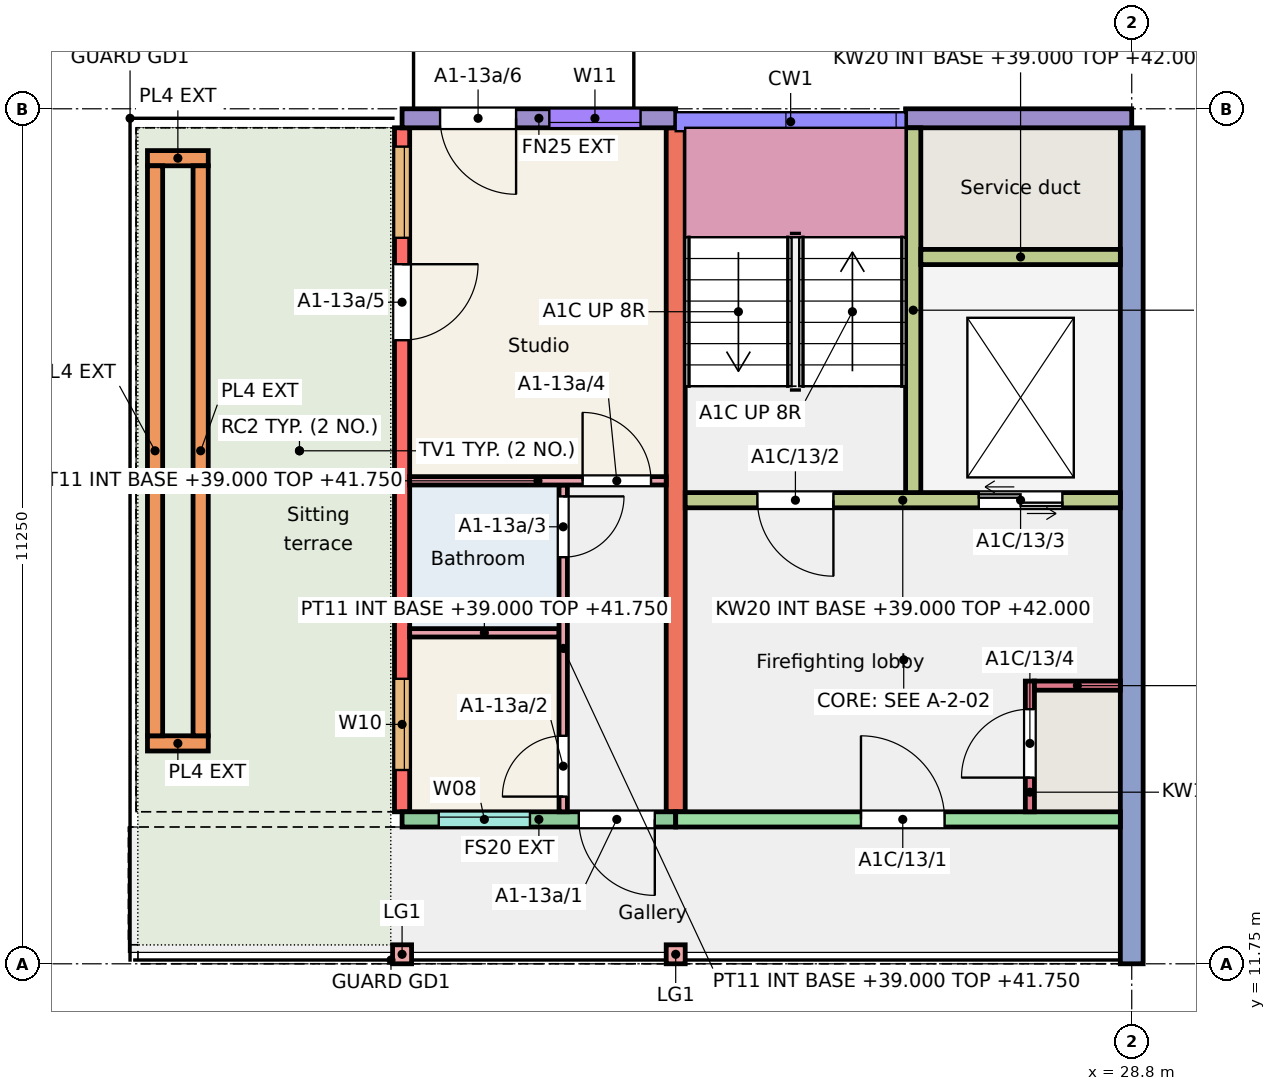
"""IFC4 building model, lengths in metres.
Left out: names, types, materials, properties, quantities, classifications, styles, units other than length and angle.
Written with IfcOpenShell. Run it as: python <this file> out.ifc"""

import sys

from ifc_helpers import new_model, si_unit, direction, frame, frame_2d, origin, origin_2d, place, context, subcontext, project, spatial, rectangle, extrude, element, fill, save


model = new_model("IFC4")
c1 = context("Model", 3, precision=1e-05, world=origin(), true_north=direction((0.0, 1.0)))
c2 = subcontext(c1, "Body", "Model", "MODEL_VIEW")
j1 = project(units=[si_unit("LENGTHUNIT", "METRE"), si_unit("PLANEANGLEUNIT", "RADIAN")], contexts=[c1])
p1 = place(None, origin())
s1 = spatial("IfcSite", under=j1, at=p1, CompositionType="ELEMENT")
p2 = place(p1, origin())
s2 = spatial("IfcBuilding", under=s1, at=p2, CompositionType="ELEMENT")
p3 = place(p2, frame((0.0, 0.0, 39.0)))
s3 = spatial("IfcBuildingStorey", under=s2, at=p3, CompositionType="ELEMENT", Elevation=39.0)
p4 = place(p3, frame((19.2, 13.75, 0.0), z_axis=(0.0, 0.0, 1.0), x_axis=(0.0, 1.0, 0.0)))
e1 = element("IfcWall", 1, at=p4, inside=s3, PredefinedType="SHEAR", context=c2, shape_type="SweptSolid", body=[
    extrude(rectangle(XDim=9.0, YDim=0.2, at=frame_2d((4.5, 0.0))), origin(), (0.0, 0.0, 1.0), 3.0),
])
p5 = place(p4, frame((0.55, 0.0, 0.9)))
e2 = element("IfcOpeningElement", 2, at=p5, cuts=e1, PredefinedType="OPENING", context=c2, shape_type="SweptSolid", body=[
    extrude(rectangle(XDim=1.2, YDim=1.5, at=frame_2d((0.6, 0.75))), frame((0.0, 0.11, 0.0), z_axis=(0.0, -1.0, 0.0), x_axis=(1.0, 0.0, 0.0)), (0.0, 0.0, 1.0), 0.22),
])
p6 = place(p4, frame((7.552, 0.0, 0.9)))
e3 = element("IfcOpeningElement", 3, at=p6, cuts=e1, PredefinedType="OPENING", context=c2, shape_type="SweptSolid", body=[
    extrude(rectangle(XDim=1.2, YDim=1.5, at=frame_2d((0.6, 0.75))), frame((0.0, 0.11, 0.0), z_axis=(0.0, -1.0, 0.0), x_axis=(1.0, 0.0, 0.0)), (0.0, 0.0, 1.0), 0.22),
])
p7 = place(p4, frame((6.205, 0.0, 0.0)))
e4 = element("IfcOpeningElement", 4, at=p7, cuts=e1, PredefinedType="OPENING", context=c2, shape_type="SweptSolid", body=[
    extrude(rectangle(XDim=1.0, YDim=2.1, at=frame_2d((0.5, 1.05))), frame((0.0, 0.11, 0.0), z_axis=(0.0, -1.0, 0.0), x_axis=(1.0, 0.0, 0.0)), (0.0, 0.0, 1.0), 0.22),
])
p8 = place(p3, frame((22.8, 13.75, 0.0), z_axis=(0.0, 0.0, 1.0), x_axis=(0.0, 1.0, 0.0)))
e5 = element("IfcWall", 5, at=p8, inside=s3, PredefinedType="SHEAR", context=c2, shape_type="SweptSolid", body=[
    extrude(rectangle(XDim=9.0, YDim=0.25, at=frame_2d((4.5, 0.0))), origin(), (0.0, 0.0, 1.0), 3.0),
])
p9 = place(p3, frame((28.8, 11.75, 0.0), z_axis=(0.0, 0.0, 1.0), x_axis=(0.0, 1.0, 0.0)))
e6 = element("IfcWall", 6, at=p9, inside=s3, PredefinedType="SHEAR", context=c2, shape_type="SweptSolid", body=[
    extrude(rectangle(XDim=11.0, YDim=0.3, at=frame_2d((5.5, 0.0))), origin(), (0.0, 0.0, 1.0), 3.0),
])
p10 = place(p3, frame((19.2, 22.875, 0.0), z_axis=(0.0, 0.0, 1.0), x_axis=(1.0, 0.0, 0.0)))
e7 = element("IfcWall", 7, at=p10, inside=s3, PredefinedType="SOLIDWALL", context=c2, shape_type="SweptSolid", body=[
    extrude(rectangle(XDim=3.6, YDim=0.25, at=frame_2d((1.8, 0.0))), origin(), (0.0, 0.0, 1.0), 3.0),
])
p11 = place(p10, frame((1.938, 0.0, 0.8)))
e8 = element("IfcOpeningElement", 8, at=p11, cuts=e7, PredefinedType="OPENING", context=c2, shape_type="SweptSolid", body=[
    extrude(rectangle(XDim=1.2, YDim=1.6, at=frame_2d((0.6, 0.8))), frame((0.0, 0.135, 0.0), z_axis=(0.0, -1.0, 0.0), x_axis=(1.0, 0.0, 0.0)), (0.0, 0.0, 1.0), 0.27),
])
p12 = place(p10, frame((0.5, 0.0, 0.0)))
e9 = element("IfcOpeningElement", 9, at=p12, cuts=e7, PredefinedType="OPENING", context=c2, shape_type="SweptSolid", body=[
    extrude(rectangle(XDim=1.0, YDim=2.1, at=frame_2d((0.5, 1.05))), frame((0.0, 0.135, 0.0), z_axis=(0.0, -1.0, 0.0), x_axis=(1.0, 0.0, 0.0)), (0.0, 0.0, 1.0), 0.27),
])
p13 = place(p3, frame((19.2, 13.65, 0.0), z_axis=(0.0, 0.0, 1.0), x_axis=(1.0, 0.0, 0.0)))
e10 = element("IfcWall", 10, at=p13, inside=s3, PredefinedType="SOLIDWALL", context=c2, shape_type="SweptSolid", body=[
    extrude(rectangle(XDim=3.6, YDim=0.2, at=frame_2d((1.8, 0.0))), origin(), (0.0, 0.0, 1.0), 3.0),
])
p14 = place(p13, frame((0.482, 0.0, 1.1)))
e11 = element("IfcOpeningElement", 11, at=p14, cuts=e10, PredefinedType="OPENING", context=c2, shape_type="SweptSolid", body=[
    extrude(rectangle(XDim=1.2, YDim=1.3, at=frame_2d((0.6, 0.65))), frame((0.0, 0.11, 0.0), z_axis=(0.0, -1.0, 0.0), x_axis=(1.0, 0.0, 0.0)), (0.0, 0.0, 1.0), 0.22),
])
p15 = place(p13, frame((2.325, 0.0, 0.0)))
e12 = element("IfcOpeningElement", 12, at=p15, cuts=e10, PredefinedType="OPENING", context=c2, shape_type="SweptSolid", body=[
    extrude(rectangle(XDim=1.0, YDim=2.1, at=frame_2d((0.5, 1.05))), frame((0.0, 0.11, 0.0), z_axis=(0.0, -1.0, 0.0), x_axis=(1.0, 0.0, 0.0)), (0.0, 0.0, 1.0), 0.22),
])
p16 = place(p3, frame((25.825, 22.875, 0.0), z_axis=(0.0, 0.0, 1.0), x_axis=(1.0, 0.0, 0.0)))
e13 = element("IfcWall", 13, at=p16, inside=s3, PredefinedType="SOLIDWALL", context=c2, shape_type="SweptSolid", body=[
    extrude(rectangle(XDim=2.975, YDim=0.25, at=frame_2d((1.488, 0.0))), origin(), (0.0, 0.0, 1.0), 3.0),
])
p17 = place(p3, frame((22.8, 13.65, 0.0), z_axis=(0.0, 0.0, 1.0), x_axis=(1.0, 0.0, 0.0)))
e14 = element("IfcWall", 14, at=p17, inside=s3, PredefinedType="SHEAR", context=c2, shape_type="SweptSolid", body=[
    extrude(rectangle(XDim=5.85, YDim=0.2, at=frame_2d((2.925, 0.0))), origin(), (0.0, 0.0, 1.0), 3.0),
])
p18 = place(p17, frame((2.438, 0.0, 0.0)))
e15 = element("IfcOpeningElement", 15, at=p18, cuts=e14, PredefinedType="OPENING", context=c2, shape_type="SweptSolid", body=[
    extrude(rectangle(XDim=1.1, YDim=2.1, at=frame_2d((0.55, 1.05))), frame((0.0, 0.11, 0.0), z_axis=(0.0, -1.0, 0.0), x_axis=(1.0, 0.0, 0.0)), (0.0, 0.0, 1.0), 0.22),
])
p19 = place(p3, frame((22.925, 17.85, 0.0), z_axis=(0.0, 0.0, 1.0), x_axis=(1.0, 0.0, 0.0)))
e16 = element("IfcWall", 16, at=p19, inside=s3, PredefinedType="SHEAR", context=c2, shape_type="SweptSolid", body=[
    extrude(rectangle(XDim=5.725, YDim=0.2, at=frame_2d((2.862, 0.0))), origin(), (0.0, 0.0, 1.0), 3.0),
])
p20 = place(p19, frame((0.95, 0.0, 0.0)))
e17 = element("IfcOpeningElement", 17, at=p20, cuts=e16, PredefinedType="OPENING", context=c2, shape_type="SweptSolid", body=[
    extrude(rectangle(XDim=1.0, YDim=2.1, at=frame_2d((0.5, 1.05))), frame((0.0, 0.11, 0.0), z_axis=(0.0, -1.0, 0.0), x_axis=(1.0, 0.0, 0.0)), (0.0, 0.0, 1.0), 0.22),
])
p21 = place(p19, frame((3.863, 0.0, 0.0)))
e18 = element("IfcOpeningElement", 18, at=p21, cuts=e16, PredefinedType="OPENING", context=c2, shape_type="SweptSolid", body=[
    extrude(rectangle(XDim=1.1, YDim=2.1, at=frame_2d((0.55, 1.05))), frame((0.0, 0.11, 0.0), z_axis=(0.0, -1.0, 0.0), x_axis=(1.0, 0.0, 0.0)), (0.0, 0.0, 1.0), 0.22),
])
p22 = place(p3, frame((25.925, 17.95, 0.0), z_axis=(0.0, 0.0, 1.0), x_axis=(0.0, 1.0, 0.0)))
e19 = element("IfcWall", 19, at=p22, inside=s3, PredefinedType="SHEAR", context=c2, shape_type="SweptSolid", body=[
    extrude(rectangle(XDim=4.8, YDim=0.2, at=frame_2d((2.4, 0.0))), origin(), (0.0, 0.0, 1.0), 3.0),
])
p23 = place(p3, frame((26.025, 21.05, 0.0), z_axis=(0.0, 0.0, 1.0), x_axis=(1.0, 0.0, 0.0)))
e20 = element("IfcWall", 20, at=p23, inside=s3, PredefinedType="SHEAR", context=c2, shape_type="SweptSolid", body=[
    extrude(rectangle(XDim=2.625, YDim=0.2, at=frame_2d((1.312, 0.0))), origin(), (0.0, 0.0, 1.0), 3.0),
])
p24 = place(p3, frame((27.46, 13.75, 0.0), z_axis=(0.0, 0.0, 1.0), x_axis=(0.0, 1.0, 0.0)))
e21 = element("IfcWall", 21, at=p24, inside=s3, PredefinedType="SHEAR", context=c2, shape_type="SweptSolid", body=[
    extrude(rectangle(XDim=1.72, YDim=0.12, at=frame_2d((0.86, 0.0))), origin(), (0.0, 0.0, 1.0), 3.0),
])
p25 = place(p24, frame((0.45, 0.0, 0.0)))
e22 = element("IfcOpeningElement", 22, at=p25, cuts=e21, PredefinedType="OPENING", context=c2, shape_type="SweptSolid", body=[
    extrude(rectangle(XDim=0.9, YDim=2.1, at=frame_2d((0.45, 1.05))), frame((0.0, 0.07, 0.0), z_axis=(0.0, -1.0, 0.0), x_axis=(1.0, 0.0, 0.0)), (0.0, 0.0, 1.0), 0.14),
])
p26 = place(p3, frame((27.52, 15.41, 0.0), z_axis=(0.0, 0.0, 1.0), x_axis=(1.0, 0.0, 0.0)))
e23 = element("IfcWall", 23, at=p26, inside=s3, PredefinedType="SHEAR", context=c2, shape_type="SweptSolid", body=[
    extrude(rectangle(XDim=1.13, YDim=0.12, at=frame_2d((0.565, 0.0))), origin(), (0.0, 0.0, 1.0), 3.0),
])
for number, where, z_axis, x_axis in (
    (24, (19.2, 11.875, 0.0), (0.0, 0.0, 1.0), (1.0, 0.0, 0.0)),
    (25, (22.8, 11.875, 0.0), (0.0, 0.0, 1.0), (1.0, 0.0, 0.0)),
):
    element("IfcColumn", number, at=place(p3, frame(where, z_axis=z_axis, x_axis=x_axis)), inside=s3, PredefinedType="COLUMN", context=c2, shape_type="SweptSolid", body=[
        extrude(rectangle(XDim=0.25, YDim=0.25, at=origin_2d()), origin(), (0.0, 0.0, 1.0), 3.0),
    ])
for number, where, z_axis, x_axis in (
    (26, (15.85, 14.65, 0.01), (0.0, 0.0, 1.0), (1.0, 0.0, 0.0)),
    (27, (15.85, 22.35, 0.01), (0.0, 0.0, 1.0), (1.0, 0.0, 0.0)),
):
    element("IfcWall", number, at=place(p3, frame(where, z_axis=z_axis, x_axis=x_axis)), inside=s3, PredefinedType="SOLIDWALL", context=c2, shape_type="SweptSolid", body=[
        extrude(rectangle(XDim=0.8, YDim=0.2, at=frame_2d((0.4, 0.0))), origin(), (0.0, 0.0, 1.0), 0.45),
    ])
for number, where, z_axis, x_axis in (
    (28, (15.95, 14.75, 0.01), (0.0, 0.0, 1.0), (0.0, 1.0, 0.0)),
    (29, (16.55, 14.75, 0.01), (0.0, 0.0, 1.0), (0.0, 1.0, 0.0)),
):
    element("IfcWall", number, at=place(p3, frame(where, z_axis=z_axis, x_axis=x_axis)), inside=s3, PredefinedType="SOLIDWALL", context=c2, shape_type="SweptSolid", body=[
        extrude(rectangle(XDim=7.5, YDim=0.2, at=frame_2d((3.75, 0.0))), origin(), (0.0, 0.0, 1.0), 0.45),
    ])
p27 = place(p3, frame((19.3, 16.105, 0.0), z_axis=(0.0, 0.0, 1.0), x_axis=(1.0, 0.0, 0.0)))
e30 = element("IfcWall", 30, at=p27, inside=s3, PredefinedType="PARTITIONING", context=c2, shape_type="SweptSolid", body=[
    extrude(rectangle(XDim=1.965, YDim=0.11, at=frame_2d((0.982, 0.0))), origin(), (0.0, 0.0, 1.0), 2.75),
])
p28 = place(p3, frame((21.32, 13.75, 0.0), z_axis=(0.0, 0.0, 1.0), x_axis=(0.0, 1.0, 0.0)))
e31 = element("IfcWall", 31, at=p28, inside=s3, PredefinedType="PARTITIONING", context=c2, shape_type="SweptSolid", body=[
    extrude(rectangle(XDim=4.3, YDim=0.11, at=frame_2d((2.15, 0.0))), origin(), (0.0, 0.0, 1.0), 2.75),
])
p29 = place(p28, frame((0.2, 0.0, 0.0)))
e32 = element("IfcOpeningElement", 32, at=p29, cuts=e31, PredefinedType="OPENING", context=c2, shape_type="SweptSolid", body=[
    extrude(rectangle(XDim=0.8, YDim=2.1, at=frame_2d((0.4, 1.05))), frame((0.0, 0.065, 0.0), z_axis=(0.0, -1.0, 0.0), x_axis=(1.0, 0.0, 0.0)), (0.0, 0.0, 1.0), 0.13),
])
p30 = place(p28, frame((3.35, 0.0, 0.0)))
e33 = element("IfcOpeningElement", 33, at=p30, cuts=e31, PredefinedType="OPENING", context=c2, shape_type="SweptSolid", body=[
    extrude(rectangle(XDim=0.8, YDim=2.1, at=frame_2d((0.4, 1.05))), frame((0.0, 0.065, 0.0), z_axis=(0.0, -1.0, 0.0), x_axis=(1.0, 0.0, 0.0)), (0.0, 0.0, 1.0), 0.13),
])
p31 = place(p3, frame((19.3, 18.105, 0.0), z_axis=(0.0, 0.0, 1.0), x_axis=(1.0, 0.0, 0.0)))
e34 = element("IfcWall", 34, at=p31, inside=s3, PredefinedType="PARTITIONING", context=c2, shape_type="SweptSolid", body=[
    extrude(rectangle(XDim=3.375, YDim=0.11, at=frame_2d((1.688, 0.0))), origin(), (0.0, 0.0, 1.0), 2.75),
])
p32 = place(p31, frame((2.275, 0.0, 0.0)))
e35 = element("IfcOpeningElement", 35, at=p32, cuts=e34, PredefinedType="OPENING", context=c2, shape_type="SweptSolid", body=[
    extrude(rectangle(XDim=0.9, YDim=2.1, at=frame_2d((0.45, 1.05))), frame((0.0, 0.065, 0.0), z_axis=(0.0, -1.0, 0.0), x_axis=(1.0, 0.0, 0.0)), (0.0, 0.0, 1.0), 0.13),
])
p33 = place(p14, origin())
e36 = element("IfcWindow", 36, at=p33, inside=s3, PartitioningType="SINGLE_PANEL", PredefinedType="WINDOW", context=c2, shape_type="SweptSolid", body=[
    extrude(rectangle(XDim=1.2, YDim=1.3, at=frame_2d((0.6, 0.65))), frame((0.0, 0.06, 0.0), z_axis=(0.0, -1.0, 0.0), x_axis=(1.0, 0.0, 0.0)), (0.0, 0.0, 1.0), 0.06),
])
fill(e11, e36)
p34 = place(p11, origin())
e37 = element("IfcWindow", 37, at=p34, inside=s3, PartitioningType="SINGLE_PANEL", PredefinedType="WINDOW", context=c2, shape_type="SweptSolid", body=[
    extrude(rectangle(XDim=1.2, YDim=1.6, at=frame_2d((0.6, 0.8))), frame((0.0, -0.025, 0.0), z_axis=(0.0, -1.0, 0.0), x_axis=(1.0, 0.0, 0.0)), (0.0, 0.0, 1.0), 0.06),
])
fill(e8, e37)
p35 = place(p5, origin())
e38 = element("IfcWindow", 38, at=p35, inside=s3, PartitioningType="SINGLE_PANEL", PredefinedType="WINDOW", context=c2, shape_type="SweptSolid", body=[
    extrude(rectangle(XDim=1.2, YDim=1.5, at=frame_2d((0.6, 0.75))), frame((0.0, 0.0, 0.0), z_axis=(0.0, -1.0, 0.0), x_axis=(1.0, 0.0, 0.0)), (0.0, 0.0, 1.0), 0.06),
])
fill(e2, e38)
p36 = place(p6, origin())
e39 = element("IfcWindow", 39, at=p36, inside=s3, PartitioningType="SINGLE_PANEL", PredefinedType="WINDOW", context=c2, shape_type="SweptSolid", body=[
    extrude(rectangle(XDim=1.2, YDim=1.5, at=frame_2d((0.6, 0.75))), frame((0.0, 0.0, 0.0), z_axis=(0.0, -1.0, 0.0), x_axis=(1.0, 0.0, 0.0)), (0.0, 0.0, 1.0), 0.06),
])
fill(e3, e39)
p37 = place(p15, origin())
e40 = element("IfcDoor", 40, at=p37, inside=s3, OperationType="SINGLE_SWING_RIGHT", PredefinedType="DOOR", context=c2, shape_type="SweptSolid", body=[
    extrude(rectangle(XDim=1.0, YDim=2.1, at=frame_2d((0.5, 1.05))), frame((0.0, 0.025, 0.0), z_axis=(0.0, -1.0, 0.0), x_axis=(1.0, 0.0, 0.0)), (0.0, 0.0, 1.0), 0.05),
])
fill(e12, e40)
p38 = place(p29, origin())
e41 = element("IfcDoor", 41, at=p38, inside=s3, OperationType="SINGLE_SWING_LEFT", PredefinedType="DOOR", context=c2, shape_type="SweptSolid", body=[
    extrude(rectangle(XDim=0.8, YDim=2.1, at=frame_2d((0.4, 1.05))), frame((0.0, 0.025, 0.0), z_axis=(0.0, -1.0, 0.0), x_axis=(1.0, 0.0, 0.0)), (0.0, 0.0, 1.0), 0.05),
])
fill(e32, e41)
p39 = place(p30, origin())
e42 = element("IfcDoor", 42, at=p39, inside=s3, OperationType="SINGLE_SWING_RIGHT", PredefinedType="DOOR", context=c2, shape_type="SweptSolid", body=[
    extrude(rectangle(XDim=0.8, YDim=2.1, at=frame_2d((0.4, 1.05))), frame((0.0, 0.025, 0.0), z_axis=(0.0, -1.0, 0.0), x_axis=(1.0, 0.0, 0.0)), (0.0, 0.0, 1.0), 0.05),
])
fill(e33, e42)
p40 = place(p32, origin())
e43 = element("IfcDoor", 43, at=p40, inside=s3, OperationType="SINGLE_SWING_LEFT", PredefinedType="DOOR", context=c2, shape_type="SweptSolid", body=[
    extrude(rectangle(XDim=0.9, YDim=2.1, at=frame_2d((0.45, 1.05))), frame((0.0, 0.025, 0.0), z_axis=(0.0, -1.0, 0.0), x_axis=(1.0, 0.0, 0.0)), (0.0, 0.0, 1.0), 0.05),
])
fill(e35, e43)
p41 = place(p7, origin())
e44 = element("IfcDoor", 44, at=p41, inside=s3, OperationType="SINGLE_SWING_RIGHT", PredefinedType="DOOR", context=c2, shape_type="SweptSolid", body=[
    extrude(rectangle(XDim=1.0, YDim=2.1, at=frame_2d((0.5, 1.05))), frame((0.0, 0.025, 0.0), z_axis=(0.0, -1.0, 0.0), x_axis=(1.0, 0.0, 0.0)), (0.0, 0.0, 1.0), 0.05),
])
fill(e4, e44)
p42 = place(p12, origin())
e45 = element("IfcDoor", 45, at=p42, inside=s3, OperationType="SINGLE_SWING_RIGHT", PredefinedType="DOOR", context=c2, shape_type="SweptSolid", body=[
    extrude(rectangle(XDim=1.0, YDim=2.1, at=frame_2d((0.5, 1.05))), frame((0.0, 0.025, 0.0), z_axis=(0.0, -1.0, 0.0), x_axis=(1.0, 0.0, 0.0)), (0.0, 0.0, 1.0), 0.05),
])
fill(e9, e45)
p43 = place(p18, origin())
e46 = element("IfcDoor", 46, at=p43, inside=s3, OperationType="SINGLE_SWING_LEFT", PredefinedType="DOOR", context=c2, shape_type="SweptSolid", body=[
    extrude(rectangle(XDim=1.1, YDim=2.1, at=frame_2d((0.55, 1.05))), frame((0.0, 0.025, 0.0), z_axis=(0.0, -1.0, 0.0), x_axis=(1.0, 0.0, 0.0)), (0.0, 0.0, 1.0), 0.05),
])
fill(e15, e46)
p44 = place(p20, origin())
e47 = element("IfcDoor", 47, at=p44, inside=s3, OperationType="SINGLE_SWING_RIGHT", PredefinedType="DOOR", context=c2, shape_type="SweptSolid", body=[
    extrude(rectangle(XDim=1.0, YDim=2.1, at=frame_2d((0.5, 1.05))), frame((0.0, 0.025, 0.0), z_axis=(0.0, -1.0, 0.0), x_axis=(1.0, 0.0, 0.0)), (0.0, 0.0, 1.0), 0.05),
])
fill(e17, e47)
p45 = place(p21, origin())
e48 = element("IfcDoor", 48, at=p45, inside=s3, OperationType="DOUBLE_DOOR_SLIDING", PredefinedType="DOOR", context=c2, shape_type="SweptSolid", body=[
    extrude(rectangle(XDim=1.1, YDim=2.1, at=frame_2d((0.55, 1.05))), frame((0.0, 0.025, 0.0), z_axis=(0.0, -1.0, 0.0), x_axis=(1.0, 0.0, 0.0)), (0.0, 0.0, 1.0), 0.05),
])
fill(e18, e48)
p46 = place(p25, origin())
e49 = element("IfcDoor", 49, at=p46, inside=s3, OperationType="SINGLE_SWING_LEFT", PredefinedType="DOOR", context=c2, shape_type="SweptSolid", body=[
    extrude(rectangle(XDim=0.9, YDim=2.1, at=frame_2d((0.45, 1.05))), frame((0.0, 0.025, 0.0), z_axis=(0.0, -1.0, 0.0), x_axis=(1.0, 0.0, 0.0)), (0.0, 0.0, 1.0), 0.05),
])
fill(e22, e49)
save(model, sys.argv[1])
